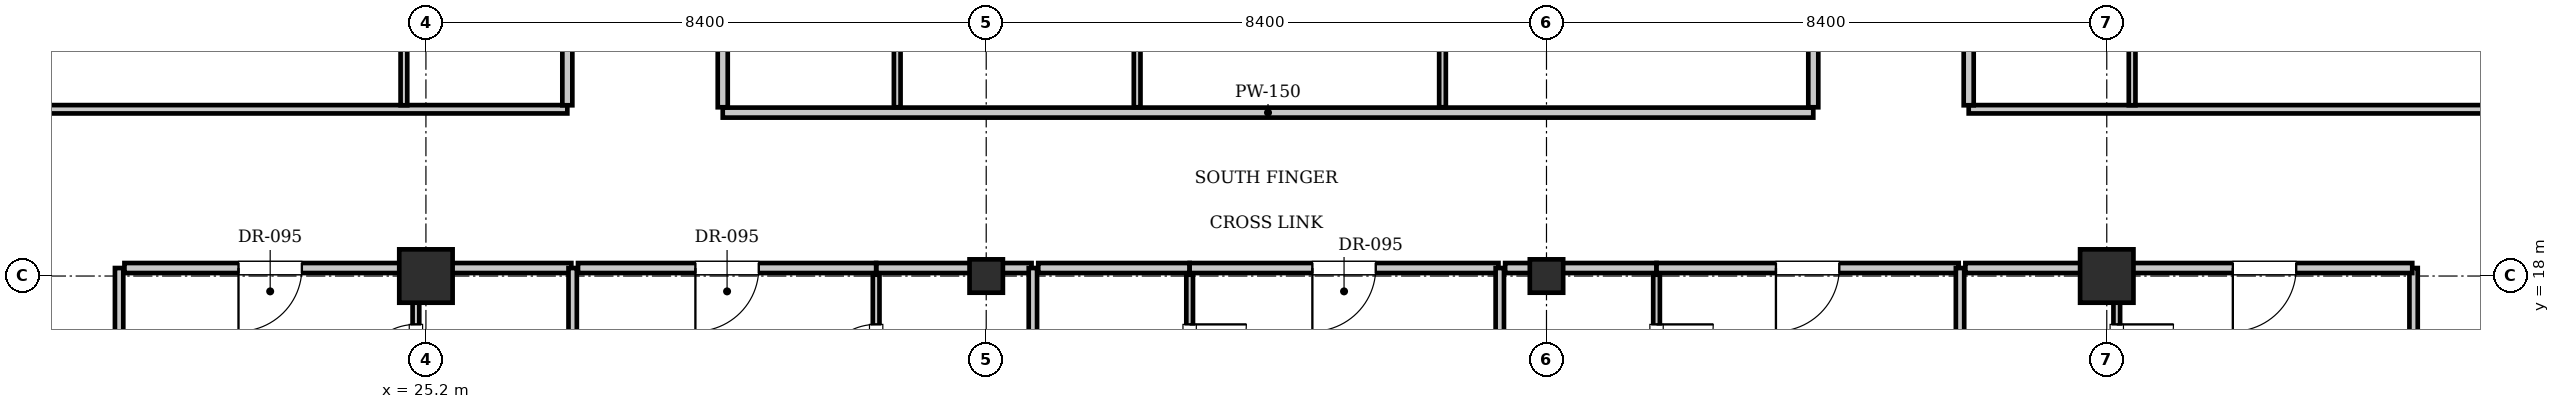
"""IFC4 building model, lengths in metres.
Left out: names, types, materials, properties, quantities, classifications, styles, units other than length and angle.
Written with IfcOpenShell. Run it as: python <this file> out.ifc"""

import sys

from ifc_helpers import new_model, si_unit, direction, frame, frame_2d, origin, origin_2d, place, context, subcontext, project, spatial, rectangle, i_section, extrude, element, fill, save


model = new_model("IFC4")
c1 = context("Model", 3, precision=1e-05, world=origin(), true_north=direction((0.0, 1.0)))
c2 = subcontext(c1, "Body", "Model", "MODEL_VIEW")
j1 = project(units=[si_unit("LENGTHUNIT", "METRE"), si_unit("PLANEANGLEUNIT", "RADIAN")], contexts=[c1])
p1 = place(None, origin())
s1 = spatial("IfcSite", under=j1, at=p1, CompositionType="ELEMENT")
p2 = place(p1, origin())
s2 = spatial("IfcBuilding", under=s1, at=p2, CompositionType="ELEMENT")
p3 = place(p2, frame((0.0, 0.0, 262.5)))
s3 = spatial("IfcBuildingStorey", under=s2, at=p3, CompositionType="ELEMENT", Elevation=262.5)
for number, where, z_axis, x_axis in (
    (1, (25.2, 18.0, 0.0), (0.0, 0.0, 1.0), (1.0, 0.0, 0.0)),
    (2, (50.4, 18.0, 0.0), (0.0, 0.0, 1.0), (1.0, 0.0, 0.0)),
):
    element("IfcColumn", number, at=place(p3, frame(where, z_axis=z_axis, x_axis=x_axis)), inside=s3, PredefinedType="COLUMN", context=c2, shape_type="SweptSolid", body=[
        extrude(rectangle(XDim=0.8, YDim=0.8, at=origin_2d()), origin(), (0.0, 0.0, 1.0), 3.85),
    ])
for number, where, z_axis, x_axis in (
    (3, (33.6, 18.0, 0.0), (0.0, 0.0, 1.0), (1.0, 0.0, 0.0)),
    (4, (42.0, 18.0, 0.0), (0.0, 0.0, 1.0), (1.0, 0.0, 0.0)),
):
    element("IfcColumn", number, at=place(p3, frame(where, z_axis=z_axis, x_axis=x_axis)), inside=s3, PredefinedType="COLUMN", context=c2, shape_type="SweptSolid", body=[
        extrude(i_section(OverallWidth=0.5, OverallDepth=0.5, WebThickness=0.022, FlangeThickness=0.032, at=origin_2d()), origin(), (0.0, 0.0, 1.0), 3.85),
    ])
p4 = place(p3, frame((29.65, 20.45, 0.0), z_axis=(0.0, 0.0, 1.0), x_axis=(1.0, 0.0, 0.0)))
e5 = element("IfcWall", 5, at=p4, inside=s3, PredefinedType="PARTITIONING", context=c2, shape_type="SweptSolid", body=[
    extrude(rectangle(XDim=16.35, YDim=0.15, at=frame_2d((8.175, 0.0))), origin(), (0.0, 0.0, 1.0), 3.61),
])
for number, where, z_axis, x_axis in (
    (6, (29.65, 20.53, 0.0), (0.0, 0.0, 1.0), (0.0, 1.0, 0.0)),
    (7, (46.0, 20.53, 0.0), (0.0, 0.0, 1.0), (0.0, 1.0, 0.0)),
):
    element("IfcWall", number, at=place(p3, frame(where, z_axis=z_axis, x_axis=x_axis)), inside=s3, PredefinedType="PARTITIONING", context=c2, shape_type="SweptSolid", body=[
        extrude(rectangle(XDim=9.29, YDim=0.15, at=frame_2d((4.645, 0.0))), origin(), (0.0, 0.0, 1.0), 3.61),
    ])
for number, where, z_axis, x_axis in (
    (8, (32.266, 20.53, 0.0), (0.0, 0.0, 1.0), (0.0, 1.0, 0.0)),
    (9, (35.863, 20.53, 0.0), (0.0, 0.0, 1.0), (0.0, 1.0, 0.0)),
    (10, (40.441, 20.53, 0.0), (0.0, 0.0, 1.0), (0.0, 1.0, 0.0)),
):
    element("IfcWall", number, at=place(p3, frame(where, z_axis=z_axis, x_axis=x_axis)), inside=s3, PredefinedType="PARTITIONING", context=c2, shape_type="SweptSolid", body=[
        extrude(rectangle(XDim=9.29, YDim=0.1, at=frame_2d((4.645, 0.0))), origin(), (0.0, 0.0, 1.0), 3.61),
    ])
for number, where, z_axis, x_axis in (
    (11, (20.6, 14.4, 0.0), (0.0, 0.0, 1.0), (0.0, 1.0, 0.0)),
    (12, (55.0, 14.4, 0.0), (0.0, 0.0, 1.0), (0.0, 1.0, 0.0)),
):
    element("IfcWall", number, at=place(p3, frame(where, z_axis=z_axis, x_axis=x_axis)), inside=s3, PredefinedType="PARTITIONING", context=c2, shape_type="SweptSolid", body=[
        extrude(rectangle(XDim=3.72, YDim=0.125, at=frame_2d((1.86, 0.0))), origin(), (0.0, 0.0, 1.0), 3.61),
    ])
p5 = place(p3, frame((25.05, 18.12, 0.0), z_axis=(0.0, 0.0, 1.0), x_axis=(1.0, 0.0, 0.0)))
e13 = element("IfcWall", 13, at=p5, inside=s3, PredefinedType="PARTITIONING", context=c2, shape_type="SweptSolid", body=[
    extrude(rectangle(XDim=2.33, YDim=0.15, at=frame_2d((1.165, 0.0))), origin(), (0.0, 0.0, 1.0), 3.077),
])
p6 = place(p3, frame((25.05, 15.68, 0.0), z_axis=(0.0, 0.0, 1.0), x_axis=(0.0, 1.0, 0.0)))
e14 = element("IfcWall", 14, at=p6, inside=s3, PredefinedType="PARTITIONING", context=c2, shape_type="SweptSolid", body=[
    extrude(rectangle(XDim=2.34, YDim=0.1, at=frame_2d((1.17, 0.0))), origin(), (0.0, 0.0, 1.0), 3.61),
])
p7 = place(p6, frame((0.745, 0.0, 0.0)))
e15 = element("IfcOpeningElement", 15, at=p7, cuts=e14, PredefinedType="OPENING", context=c2, shape_type="SweptSolid", body=[
    extrude(rectangle(XDim=0.85, YDim=2.1, at=frame_2d((0.425, 1.05))), frame((0.0, 0.06, 0.0), z_axis=(0.0, -1.0, 0.0), x_axis=(1.0, 0.0, 0.0)), (0.0, 0.0, 1.0), 0.12),
])
p8 = place(p3, frame((20.68, 18.12, 0.0), z_axis=(0.0, 0.0, 1.0), x_axis=(1.0, 0.0, 0.0)))
e16 = element("IfcWall", 16, at=p8, inside=s3, PredefinedType="PARTITIONING", context=c2, shape_type="SweptSolid", body=[
    extrude(rectangle(XDim=4.37, YDim=0.15, at=frame_2d((2.185, 0.0))), origin(), (0.0, 0.0, 1.0), 3.077),
])
p9 = place(p8, frame((1.71, 0.0, 0.0)))
e17 = element("IfcOpeningElement", 17, at=p9, cuts=e16, PredefinedType="OPENING", context=c2, shape_type="SweptSolid", body=[
    extrude(rectangle(XDim=0.95, YDim=2.15, at=frame_2d((0.475, 1.075))), frame((0.0, 0.085, 0.0), z_axis=(0.0, -1.0, 0.0), x_axis=(1.0, 0.0, 0.0)), (0.0, 0.0, 1.0), 0.17),
])
p10 = place(p3, frame((27.4, 9.3, 0.0), z_axis=(0.0, 0.0, 1.0), x_axis=(0.0, 1.0, 0.0)))
e18 = element("IfcWall", 18, at=p10, inside=s3, PredefinedType="PARTITIONING", context=c2, shape_type="SweptSolid", body=[
    extrude(rectangle(XDim=8.82, YDim=0.125, at=frame_2d((4.41, 0.0))), origin(), (0.0, 0.0, 1.0), 3.61),
])
p11 = place(p3, frame((31.95, 18.12, 0.0), z_axis=(0.0, 0.0, 1.0), x_axis=(1.0, 0.0, 0.0)))
e19 = element("IfcWall", 19, at=p11, inside=s3, PredefinedType="PARTITIONING", context=c2, shape_type="SweptSolid", body=[
    extrude(rectangle(XDim=2.33, YDim=0.15, at=frame_2d((1.165, 0.0))), origin(), (0.0, 0.0, 1.0), 3.077),
])
p12 = place(p3, frame((31.95, 15.68, 0.0), z_axis=(0.0, 0.0, 1.0), x_axis=(0.0, 1.0, 0.0)))
e20 = element("IfcWall", 20, at=p12, inside=s3, PredefinedType="PARTITIONING", context=c2, shape_type="SweptSolid", body=[
    extrude(rectangle(XDim=2.34, YDim=0.1, at=frame_2d((1.17, 0.0))), origin(), (0.0, 0.0, 1.0), 3.61),
])
p13 = place(p12, frame((0.745, 0.0, 0.0)))
e21 = element("IfcOpeningElement", 21, at=p13, cuts=e20, PredefinedType="OPENING", context=c2, shape_type="SweptSolid", body=[
    extrude(rectangle(XDim=0.85, YDim=2.1, at=frame_2d((0.425, 1.05))), frame((0.0, 0.06, 0.0), z_axis=(0.0, -1.0, 0.0), x_axis=(1.0, 0.0, 0.0)), (0.0, 0.0, 1.0), 0.12),
])
p14 = place(p3, frame((27.48, 18.12, 0.0), z_axis=(0.0, 0.0, 1.0), x_axis=(1.0, 0.0, 0.0)))
e22 = element("IfcWall", 22, at=p14, inside=s3, PredefinedType="PARTITIONING", context=c2, shape_type="SweptSolid", body=[
    extrude(rectangle(XDim=4.47, YDim=0.15, at=frame_2d((2.235, 0.0))), origin(), (0.0, 0.0, 1.0), 3.077),
])
p15 = place(p14, frame((1.76, 0.0, 0.0)))
e23 = element("IfcOpeningElement", 23, at=p15, cuts=e22, PredefinedType="OPENING", context=c2, shape_type="SweptSolid", body=[
    extrude(rectangle(XDim=0.95, YDim=2.15, at=frame_2d((0.475, 1.075))), frame((0.0, 0.085, 0.0), z_axis=(0.0, -1.0, 0.0), x_axis=(1.0, 0.0, 0.0)), (0.0, 0.0, 1.0), 0.17),
])
p16 = place(p3, frame((34.3, 9.3, 0.0), z_axis=(0.0, 0.0, 1.0), x_axis=(0.0, 1.0, 0.0)))
e24 = element("IfcWall", 24, at=p16, inside=s3, PredefinedType="PARTITIONING", context=c2, shape_type="SweptSolid", body=[
    extrude(rectangle(XDim=8.82, YDim=0.125, at=frame_2d((4.41, 0.0))), origin(), (0.0, 0.0, 1.0), 3.61),
])
p17 = place(p3, frame((34.38, 18.12, 0.0), z_axis=(0.0, 0.0, 1.0), x_axis=(1.0, 0.0, 0.0)))
e25 = element("IfcWall", 25, at=p17, inside=s3, PredefinedType="PARTITIONING", context=c2, shape_type="SweptSolid", body=[
    extrude(rectangle(XDim=2.27, YDim=0.15, at=frame_2d((1.135, 0.0))), origin(), (0.0, 0.0, 1.0), 3.077),
])
p18 = place(p3, frame((36.65, 15.68, 0.0), z_axis=(0.0, 0.0, 1.0), x_axis=(0.0, 1.0, 0.0)))
e26 = element("IfcWall", 26, at=p18, inside=s3, PredefinedType="PARTITIONING", context=c2, shape_type="SweptSolid", body=[
    extrude(rectangle(XDim=2.34, YDim=0.1, at=frame_2d((1.17, 0.0))), origin(), (0.0, 0.0, 1.0), 3.61),
])
p19 = place(p18, frame((0.745, 0.0, 0.0)))
e27 = element("IfcOpeningElement", 27, at=p19, cuts=e26, PredefinedType="OPENING", context=c2, shape_type="SweptSolid", body=[
    extrude(rectangle(XDim=0.85, YDim=2.1, at=frame_2d((0.425, 1.05))), frame((0.0, 0.06, 0.0), z_axis=(0.0, -1.0, 0.0), x_axis=(1.0, 0.0, 0.0)), (0.0, 0.0, 1.0), 0.12),
])
p20 = place(p3, frame((36.65, 18.12, 0.0), z_axis=(0.0, 0.0, 1.0), x_axis=(1.0, 0.0, 0.0)))
e28 = element("IfcWall", 28, at=p20, inside=s3, PredefinedType="PARTITIONING", context=c2, shape_type="SweptSolid", body=[
    extrude(rectangle(XDim=4.63, YDim=0.15, at=frame_2d((2.315, 0.0))), origin(), (0.0, 0.0, 1.0), 3.077),
])
p21 = place(p20, frame((1.84, 0.0, 0.0)))
e29 = element("IfcOpeningElement", 29, at=p21, cuts=e28, PredefinedType="OPENING", context=c2, shape_type="SweptSolid", body=[
    extrude(rectangle(XDim=0.95, YDim=2.15, at=frame_2d((0.475, 1.075))), frame((0.0, 0.085, 0.0), z_axis=(0.0, -1.0, 0.0), x_axis=(1.0, 0.0, 0.0)), (0.0, 0.0, 1.0), 0.17),
])
p22 = place(p3, frame((41.3, 9.3, 0.0), z_axis=(0.0, 0.0, 1.0), x_axis=(0.0, 1.0, 0.0)))
e30 = element("IfcWall", 30, at=p22, inside=s3, PredefinedType="PARTITIONING", context=c2, shape_type="SweptSolid", body=[
    extrude(rectangle(XDim=8.82, YDim=0.125, at=frame_2d((4.41, 0.0))), origin(), (0.0, 0.0, 1.0), 3.61),
])
p23 = place(p3, frame((41.38, 18.12, 0.0), z_axis=(0.0, 0.0, 1.0), x_axis=(1.0, 0.0, 0.0)))
e31 = element("IfcWall", 31, at=p23, inside=s3, PredefinedType="PARTITIONING", context=c2, shape_type="SweptSolid", body=[
    extrude(rectangle(XDim=2.27, YDim=0.15, at=frame_2d((1.135, 0.0))), origin(), (0.0, 0.0, 1.0), 3.077),
])
p24 = place(p3, frame((43.65, 15.68, 0.0), z_axis=(0.0, 0.0, 1.0), x_axis=(0.0, 1.0, 0.0)))
e32 = element("IfcWall", 32, at=p24, inside=s3, PredefinedType="PARTITIONING", context=c2, shape_type="SweptSolid", body=[
    extrude(rectangle(XDim=2.34, YDim=0.1, at=frame_2d((1.17, 0.0))), origin(), (0.0, 0.0, 1.0), 3.61),
])
p25 = place(p24, frame((0.745, 0.0, 0.0)))
e33 = element("IfcOpeningElement", 33, at=p25, cuts=e32, PredefinedType="OPENING", context=c2, shape_type="SweptSolid", body=[
    extrude(rectangle(XDim=0.85, YDim=2.1, at=frame_2d((0.425, 1.05))), frame((0.0, 0.06, 0.0), z_axis=(0.0, -1.0, 0.0), x_axis=(1.0, 0.0, 0.0)), (0.0, 0.0, 1.0), 0.12),
])
p26 = place(p3, frame((43.65, 18.12, 0.0), z_axis=(0.0, 0.0, 1.0), x_axis=(1.0, 0.0, 0.0)))
e34 = element("IfcWall", 34, at=p26, inside=s3, PredefinedType="PARTITIONING", context=c2, shape_type="SweptSolid", body=[
    extrude(rectangle(XDim=4.53, YDim=0.15, at=frame_2d((2.265, 0.0))), origin(), (0.0, 0.0, 1.0), 3.077),
])
p27 = place(p26, frame((1.79, 0.0, 0.0)))
e35 = element("IfcOpeningElement", 35, at=p27, cuts=e34, PredefinedType="OPENING", context=c2, shape_type="SweptSolid", body=[
    extrude(rectangle(XDim=0.95, YDim=2.15, at=frame_2d((0.475, 1.075))), frame((0.0, 0.085, 0.0), z_axis=(0.0, -1.0, 0.0), x_axis=(1.0, 0.0, 0.0)), (0.0, 0.0, 1.0), 0.17),
])
p28 = place(p3, frame((48.2, 9.3, 0.0), z_axis=(0.0, 0.0, 1.0), x_axis=(0.0, 1.0, 0.0)))
e36 = element("IfcWall", 36, at=p28, inside=s3, PredefinedType="PARTITIONING", context=c2, shape_type="SweptSolid", body=[
    extrude(rectangle(XDim=8.82, YDim=0.125, at=frame_2d((4.41, 0.0))), origin(), (0.0, 0.0, 1.0), 3.61),
])
p29 = place(p3, frame((48.28, 18.12, 0.0), z_axis=(0.0, 0.0, 1.0), x_axis=(1.0, 0.0, 0.0)))
e37 = element("IfcWall", 37, at=p29, inside=s3, PredefinedType="PARTITIONING", context=c2, shape_type="SweptSolid", body=[
    extrude(rectangle(XDim=2.27, YDim=0.15, at=frame_2d((1.135, 0.0))), origin(), (0.0, 0.0, 1.0), 3.077),
])
p30 = place(p3, frame((50.55, 15.68, 0.0), z_axis=(0.0, 0.0, 1.0), x_axis=(0.0, 1.0, 0.0)))
e38 = element("IfcWall", 38, at=p30, inside=s3, PredefinedType="PARTITIONING", context=c2, shape_type="SweptSolid", body=[
    extrude(rectangle(XDim=2.34, YDim=0.1, at=frame_2d((1.17, 0.0))), origin(), (0.0, 0.0, 1.0), 3.61),
])
p31 = place(p30, frame((0.745, 0.0, 0.0)))
e39 = element("IfcOpeningElement", 39, at=p31, cuts=e38, PredefinedType="OPENING", context=c2, shape_type="SweptSolid", body=[
    extrude(rectangle(XDim=0.85, YDim=2.1, at=frame_2d((0.425, 1.05))), frame((0.0, 0.06, 0.0), z_axis=(0.0, -1.0, 0.0), x_axis=(1.0, 0.0, 0.0)), (0.0, 0.0, 1.0), 0.12),
])
p32 = place(p3, frame((50.55, 18.12, 0.0), z_axis=(0.0, 0.0, 1.0), x_axis=(1.0, 0.0, 0.0)))
e40 = element("IfcWall", 40, at=p32, inside=s3, PredefinedType="PARTITIONING", context=c2, shape_type="SweptSolid", body=[
    extrude(rectangle(XDim=4.43, YDim=0.15, at=frame_2d((2.215, 0.0))), origin(), (0.0, 0.0, 1.0), 3.077),
])
p33 = place(p32, frame((1.74, 0.0, 0.0)))
e41 = element("IfcOpeningElement", 41, at=p33, cuts=e40, PredefinedType="OPENING", context=c2, shape_type="SweptSolid", body=[
    extrude(rectangle(XDim=0.95, YDim=2.15, at=frame_2d((0.475, 1.075))), frame((0.0, 0.085, 0.0), z_axis=(0.0, -1.0, 0.0), x_axis=(1.0, 0.0, 0.0)), (0.0, 0.0, 1.0), 0.17),
])
p34 = place(p3, frame((15.5, 20.5, 0.0), z_axis=(0.0, 0.0, 1.0), x_axis=(1.0, 0.0, 0.0)))
e42 = element("IfcWall", 42, at=p34, inside=s3, PredefinedType="PARTITIONING", context=c2, shape_type="SweptSolid", body=[
    extrude(rectangle(XDim=11.82, YDim=0.125, at=frame_2d((5.91, 0.0))), origin(), (0.0, 0.0, 1.0), 3.61),
])
p35 = place(p3, frame((48.33, 20.5, 0.0), z_axis=(0.0, 0.0, 1.0), x_axis=(1.0, 0.0, 0.0)))
e43 = element("IfcWall", 43, at=p35, inside=s3, PredefinedType="PARTITIONING", context=c2, shape_type="SweptSolid", body=[
    extrude(rectangle(XDim=11.77, YDim=0.125, at=frame_2d((5.885, 0.0))), origin(), (0.0, 0.0, 1.0), 3.61),
])
p36 = place(p3, frame((27.32, 20.56, 0.0), z_axis=(0.0, 0.0, 1.0), x_axis=(0.0, 1.0, 0.0)))
e44 = element("IfcWall", 44, at=p36, inside=s3, PredefinedType="PARTITIONING", context=c2, shape_type="SweptSolid", body=[
    extrude(rectangle(XDim=2.08, YDim=0.15, at=frame_2d((1.04, 0.0))), origin(), (0.0, 0.0, 1.0), 3.61),
])
p37 = place(p3, frame((24.87, 20.56, 0.0), z_axis=(0.0, 0.0, 1.0), x_axis=(0.0, 1.0, 0.0)))
e45 = element("IfcWall", 45, at=p37, inside=s3, PredefinedType="PARTITIONING", context=c2, shape_type="SweptSolid", body=[
    extrude(rectangle(XDim=2.08, YDim=0.1, at=frame_2d((1.04, 0.0))), origin(), (0.0, 0.0, 1.0), 3.61),
])
p38 = place(p3, frame((48.33, 20.56, 0.0), z_axis=(0.0, 0.0, 1.0), x_axis=(0.0, 1.0, 0.0)))
e46 = element("IfcWall", 46, at=p38, inside=s3, PredefinedType="PARTITIONING", context=c2, shape_type="SweptSolid", body=[
    extrude(rectangle(XDim=2.08, YDim=0.15, at=frame_2d((1.04, 0.0))), origin(), (0.0, 0.0, 1.0), 3.61),
])
p39 = place(p3, frame((50.78, 20.56, 0.0), z_axis=(0.0, 0.0, 1.0), x_axis=(0.0, 1.0, 0.0)))
e47 = element("IfcWall", 47, at=p39, inside=s3, PredefinedType="PARTITIONING", context=c2, shape_type="SweptSolid", body=[
    extrude(rectangle(XDim=2.08, YDim=0.1, at=frame_2d((1.04, 0.0))), origin(), (0.0, 0.0, 1.0), 3.61),
])
p40 = place(p7, origin())
e48 = element("IfcDoor", 48, at=p40, inside=s3, OperationType="SINGLE_SWING_LEFT", PredefinedType="DOOR", context=c2, shape_type="SweptSolid", body=[
    extrude(rectangle(XDim=0.85, YDim=2.1, at=frame_2d((0.425, 1.05))), frame((0.0, 0.025, 0.0), z_axis=(0.0, -1.0, 0.0), x_axis=(1.0, 0.0, 0.0)), (0.0, 0.0, 1.0), 0.05),
])
fill(e15, e48)
p41 = place(p9, frame((0.95, 0.0, 0.0), z_axis=(0.0, 0.0, 1.0), x_axis=(-1.0, 0.0, 0.0)))
e49 = element("IfcDoor", 49, at=p41, inside=s3, OperationType="SINGLE_SWING_RIGHT", PredefinedType="DOOR", context=c2, shape_type="SweptSolid", body=[
    extrude(rectangle(XDim=0.95, YDim=2.15, at=frame_2d((0.475, 1.075))), frame((0.0, 0.025, 0.0), z_axis=(0.0, -1.0, 0.0), x_axis=(1.0, 0.0, 0.0)), (0.0, 0.0, 1.0), 0.05),
])
fill(e17, e49)
p42 = place(p13, origin())
e50 = element("IfcDoor", 50, at=p42, inside=s3, OperationType="SINGLE_SWING_LEFT", PredefinedType="DOOR", context=c2, shape_type="SweptSolid", body=[
    extrude(rectangle(XDim=0.85, YDim=2.1, at=frame_2d((0.425, 1.05))), frame((0.0, 0.025, 0.0), z_axis=(0.0, -1.0, 0.0), x_axis=(1.0, 0.0, 0.0)), (0.0, 0.0, 1.0), 0.05),
])
fill(e21, e50)
p43 = place(p15, frame((0.95, 0.0, 0.0), z_axis=(0.0, 0.0, 1.0), x_axis=(-1.0, 0.0, 0.0)))
e51 = element("IfcDoor", 51, at=p43, inside=s3, OperationType="SINGLE_SWING_RIGHT", PredefinedType="DOOR", context=c2, shape_type="SweptSolid", body=[
    extrude(rectangle(XDim=0.95, YDim=2.15, at=frame_2d((0.475, 1.075))), frame((0.0, 0.025, 0.0), z_axis=(0.0, -1.0, 0.0), x_axis=(1.0, 0.0, 0.0)), (0.0, 0.0, 1.0), 0.05),
])
fill(e23, e51)
p44 = place(p19, frame((0.85, 0.0, 0.0), z_axis=(0.0, 0.0, 1.0), x_axis=(-1.0, 0.0, 0.0)))
e52 = element("IfcDoor", 52, at=p44, inside=s3, OperationType="SINGLE_SWING_LEFT", PredefinedType="DOOR", context=c2, shape_type="SweptSolid", body=[
    extrude(rectangle(XDim=0.85, YDim=2.1, at=frame_2d((0.425, 1.05))), frame((0.0, 0.025, 0.0), z_axis=(0.0, -1.0, 0.0), x_axis=(1.0, 0.0, 0.0)), (0.0, 0.0, 1.0), 0.05),
])
fill(e27, e52)
p45 = place(p21, frame((0.95, 0.0, 0.0), z_axis=(0.0, 0.0, 1.0), x_axis=(-1.0, 0.0, 0.0)))
e53 = element("IfcDoor", 53, at=p45, inside=s3, OperationType="SINGLE_SWING_RIGHT", PredefinedType="DOOR", context=c2, shape_type="SweptSolid", body=[
    extrude(rectangle(XDim=0.95, YDim=2.15, at=frame_2d((0.475, 1.075))), frame((0.0, 0.025, 0.0), z_axis=(0.0, -1.0, 0.0), x_axis=(1.0, 0.0, 0.0)), (0.0, 0.0, 1.0), 0.05),
])
fill(e29, e53)
p46 = place(p25, frame((0.85, 0.0, 0.0), z_axis=(0.0, 0.0, 1.0), x_axis=(-1.0, 0.0, 0.0)))
e54 = element("IfcDoor", 54, at=p46, inside=s3, OperationType="SINGLE_SWING_LEFT", PredefinedType="DOOR", context=c2, shape_type="SweptSolid", body=[
    extrude(rectangle(XDim=0.85, YDim=2.1, at=frame_2d((0.425, 1.05))), frame((0.0, 0.025, 0.0), z_axis=(0.0, -1.0, 0.0), x_axis=(1.0, 0.0, 0.0)), (0.0, 0.0, 1.0), 0.05),
])
fill(e33, e54)
p47 = place(p27, frame((0.95, 0.0, 0.0), z_axis=(0.0, 0.0, 1.0), x_axis=(-1.0, 0.0, 0.0)))
e55 = element("IfcDoor", 55, at=p47, inside=s3, OperationType="SINGLE_SWING_RIGHT", PredefinedType="DOOR", context=c2, shape_type="SweptSolid", body=[
    extrude(rectangle(XDim=0.95, YDim=2.15, at=frame_2d((0.475, 1.075))), frame((0.0, 0.025, 0.0), z_axis=(0.0, -1.0, 0.0), x_axis=(1.0, 0.0, 0.0)), (0.0, 0.0, 1.0), 0.05),
])
fill(e35, e55)
p48 = place(p31, frame((0.85, 0.0, 0.0), z_axis=(0.0, 0.0, 1.0), x_axis=(-1.0, 0.0, 0.0)))
e56 = element("IfcDoor", 56, at=p48, inside=s3, OperationType="SINGLE_SWING_LEFT", PredefinedType="DOOR", context=c2, shape_type="SweptSolid", body=[
    extrude(rectangle(XDim=0.85, YDim=2.1, at=frame_2d((0.425, 1.05))), frame((0.0, 0.025, 0.0), z_axis=(0.0, -1.0, 0.0), x_axis=(1.0, 0.0, 0.0)), (0.0, 0.0, 1.0), 0.05),
])
fill(e39, e56)
p49 = place(p33, frame((0.95, 0.0, 0.0), z_axis=(0.0, 0.0, 1.0), x_axis=(-1.0, 0.0, 0.0)))
e57 = element("IfcDoor", 57, at=p49, inside=s3, OperationType="SINGLE_SWING_RIGHT", PredefinedType="DOOR", context=c2, shape_type="SweptSolid", body=[
    extrude(rectangle(XDim=0.95, YDim=2.15, at=frame_2d((0.475, 1.075))), frame((0.0, 0.025, 0.0), z_axis=(0.0, -1.0, 0.0), x_axis=(1.0, 0.0, 0.0)), (0.0, 0.0, 1.0), 0.05),
])
fill(e41, e57)
save(model, sys.argv[1])
